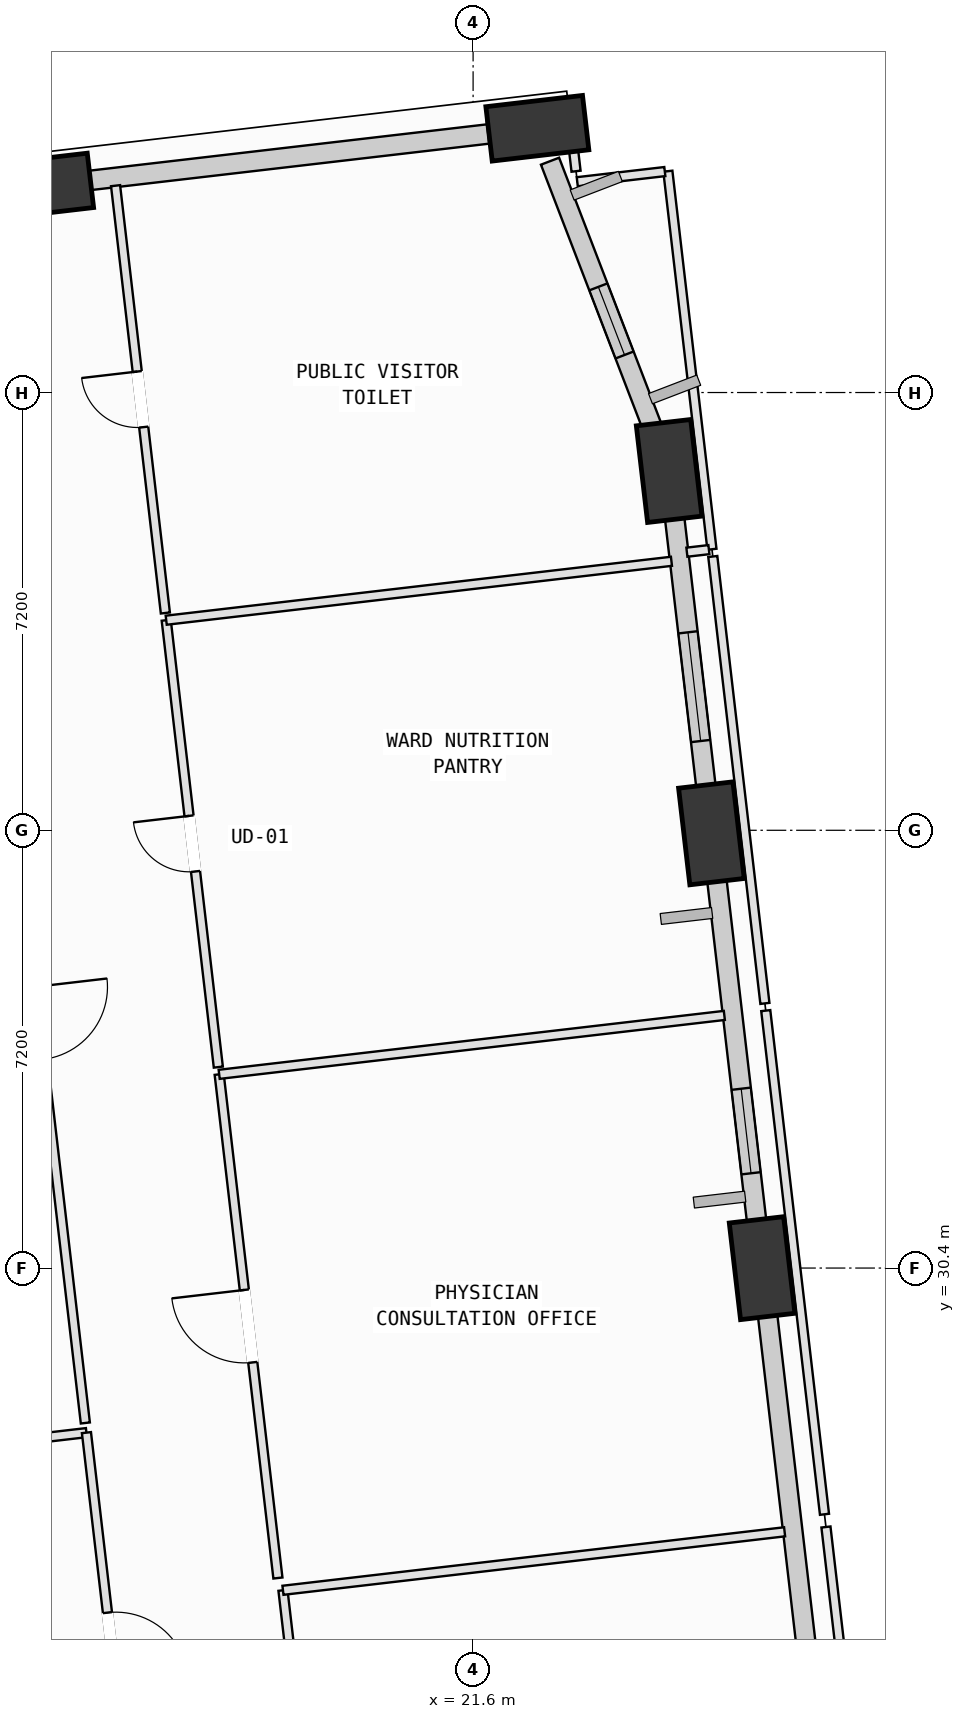
"""IFC4 building model, lengths in metres.
Left out: names, types, materials, properties, quantities, classifications, styles, units other than length and angle.
Written with IfcOpenShell. Run it as: python <this file> out.ifc"""

import sys

from ifc_helpers import new_model, si_unit, direction, frame, frame_2d, origin, origin_2d, place, context, subcontext, project, spatial, rectangle, extrude, element, fill, save


model = new_model("IFC4")
c1 = context("Model", 3, precision=1e-05, world=origin(), true_north=direction((0.0, 1.0)))
c2 = subcontext(c1, "Body", "Model", "MODEL_VIEW")
j1 = project(units=[si_unit("LENGTHUNIT", "METRE"), si_unit("PLANEANGLEUNIT", "RADIAN")], contexts=[c1])
p1 = place(None, origin())
s1 = spatial("IfcSite", under=j1, at=p1, CompositionType="ELEMENT")
p2 = place(p1, origin())
s2 = spatial("IfcBuilding", under=s1, at=p2, CompositionType="ELEMENT")
p3 = place(p2, frame((0.0, 0.0, 51.0)))
s3 = spatial("IfcBuildingStorey", under=s2, at=p3, CompositionType="ELEMENT", Elevation=51.0)
p4 = place(p3, frame((26.353, 30.398, 0.002), z_axis=(-0.022891292397, -0.030216505964, 0.999281217426), x_axis=(0.507057413613, 0.861089427661, 0.037653377935)))
e1 = element("IfcColumn", 1, at=p4, inside=s3, PredefinedType="COLUMN", context=c2, shape_type="SweptSolid", body=[
    extrude(rectangle(XDim=1.6, YDim=0.9, at=origin_2d()), origin(), (0.0, 0.0, 1.0), 4.0),
])
p5 = place(p3, frame((25.519, 37.55, 0.002), z_axis=(-0.052493535707, -0.033837296536, 0.998047827547), x_axis=(0.770485262961, 0.634432213866, 0.062034067813)))
e2 = element("IfcColumn", 2, at=p5, inside=s3, PredefinedType="COLUMN", context=c2, shape_type="SweptSolid", body=[
    extrude(rectangle(XDim=1.6, YDim=0.9, at=origin_2d()), origin(), (0.0, 0.0, 1.0), 4.004),
])
p6 = place(p3, frame((24.824, 43.51, 0.002), z_axis=(-0.076993381797, -0.036883786062, 0.996349138347), x_axis=(0.842487077733, 0.532000818436, 0.084797718345)))
e3 = element("IfcColumn", 3, at=p6, inside=s3, PredefinedType="COLUMN", context=c2, shape_type="SweptSolid", body=[
    extrude(rectangle(XDim=1.6, YDim=0.9, at=origin_2d()), origin(), (0.0, 0.0, 1.0), 4.011),
])
p7 = place(p3, frame((22.657, 49.146, 0.002), z_axis=(-0.099939863452, -0.045901905692, 0.993934121935), x_axis=(0.519165501749, -0.854578832845, 0.012735786087)))
e4 = element("IfcColumn", 4, at=p7, inside=s3, PredefinedType="COLUMN", context=c2, shape_type="SweptSolid", body=[
    extrude(rectangle(XDim=1.6, YDim=0.9, at=origin_2d()), origin(), (0.0, 0.0, 1.0), 4.021),
])
p8 = place(p3, frame((14.512, 48.197, 0.002), z_axis=(-0.095588978911, -0.079283693352, 0.992258455786), x_axis=(0.722555490387, -0.691163316507, 0.014381697639)))
e5 = element("IfcColumn", 5, at=p8, inside=s3, PredefinedType="COLUMN", context=c2, shape_type="SweptSolid", body=[
    extrude(rectangle(XDim=1.6, YDim=0.9, at=origin_2d()), origin(), (0.0, 0.0, 1.0), 4.028),
])
p9 = place(p3, frame((27.186, 23.25, 0.0), z_axis=(0.0, 0.0, 1.0), x_axis=(-0.115796553451, 0.993272952521, 0.0)))
e6 = element("IfcWall", 6, at=p9, inside=s3, PredefinedType="SOLIDWALL", context=c2, shape_type="SweptSolid", body=[
    extrude(rectangle(XDim=6.536, YDim=0.32, at=frame_2d((3.268, 0.0))), origin(), (0.0, 0.0, 1.0), 3.165),
])
p10 = place(p3, frame((26.289, 30.946, 0.0), z_axis=(0.0, 0.0, 1.0), x_axis=(-0.11579232978, 0.99327344491, 0.0)))
e7 = element("IfcWall", 7, at=p10, inside=s3, PredefinedType="SOLIDWALL", context=c2, shape_type="SweptSolid", body=[
    extrude(rectangle(XDim=5.996, YDim=0.32, at=frame_2d((2.998, 0.0))), origin(), (0.0, 0.0, 1.0), 3.165),
])
p11 = place(p10, frame((1.02, 0.0, 0.75)))
e8 = element("IfcOpeningElement", 8, at=p11, cuts=e7, PredefinedType="OPENING", context=c2, shape_type="SweptSolid", body=[
    extrude(rectangle(XDim=1.4, YDim=1.85, at=frame_2d((0.7, 0.925))), frame((0.0, 0.17, 0.0), z_axis=(0.0, -1.0, 0.0), x_axis=(1.0, 0.0, 0.0)), (0.0, 0.0, 1.0), 0.34),
])
p12 = place(p3, frame((25.456, 38.088, 0.0), z_axis=(0.0, 0.0, 1.0), x_axis=(-0.115776512347, 0.993275288723, 0.0)))
e9 = element("IfcWall", 9, at=p12, inside=s3, PredefinedType="SOLIDWALL", context=c2, shape_type="SweptSolid", body=[
    extrude(rectangle(XDim=4.816, YDim=0.32, at=frame_2d((2.408, 0.0))), origin(), (0.0, 0.0, 1.0), 3.165),
])
p13 = place(p12, frame((0.986, 0.0, 0.75)))
e10 = element("IfcOpeningElement", 10, at=p13, cuts=e9, PredefinedType="OPENING", context=c2, shape_type="SweptSolid", body=[
    extrude(rectangle(XDim=1.8, YDim=2.05, at=frame_2d((0.9, 1.025))), frame((0.0, 0.17, 0.0), z_axis=(0.0, -1.0, 0.0), x_axis=(1.0, 0.0, 0.0)), (0.0, 0.0, 1.0), 0.34),
])
p14 = place(p3, frame((22.865, 48.605, 0.0), z_axis=(0.0, 0.0, 1.0), x_axis=(0.358898766582, -0.933376491747, 0.0)))
e11 = element("IfcWall", 11, at=p14, inside=s3, PredefinedType="SOLIDWALL", context=c2, shape_type="SweptSolid", body=[
    extrude(rectangle(XDim=4.889, YDim=0.32, at=frame_2d((2.444, 0.0))), origin(), (0.0, 0.0, 1.0), 3.165),
])
p15 = place(p14, frame((2.215, 0.0, 0.75)))
e12 = element("IfcOpeningElement", 12, at=p15, cuts=e11, PredefinedType="OPENING", context=c2, shape_type="SweptSolid", body=[
    extrude(rectangle(XDim=1.2, YDim=1.75, at=frame_2d((0.6, 0.875))), frame((0.0, 0.17, 0.0), z_axis=(0.0, -1.0, 0.0), x_axis=(1.0, 0.0, 0.0)), (0.0, 0.0, 1.0), 0.34),
])
p16 = place(p3, frame((14.892, 48.241, 0.0), z_axis=(0.0, 0.0, 1.0), x_axis=(0.993270961566, 0.11581363007, 0.0)))
e13 = element("IfcWall", 13, at=p16, inside=s3, PredefinedType="SOLIDWALL", context=c2, shape_type="SweptSolid", body=[
    extrude(rectangle(XDim=7.003, YDim=0.32, at=frame_2d((3.501, 0.0))), origin(), (0.0, 0.0, 1.0), 3.165),
])
p17 = place(p3, frame((5.89, 26.603, 0.0), z_axis=(0.0, 0.0, 1.0), x_axis=(0.993273780871, 0.115789447851, 0.0)))
e14 = element("IfcWall", 14, at=p17, inside=s3, PredefinedType="PARTITIONING", context=c2, shape_type="SweptSolid", body=[
    extrude(rectangle(XDim=9.414, YDim=0.15, at=frame_2d((4.707, 0.0))), origin(), (0.0, 0.0, 1.0), 3.78),
])
p18 = place(p3, frame((15.241, 27.693, 0.0), z_axis=(0.0, 0.0, 1.0), x_axis=(0.115911530518, -0.993259541657, 0.0)))
e15 = element("IfcWall", 15, at=p18, inside=s3, PredefinedType="PARTITIONING", context=c2, shape_type="SweptSolid", body=[
    extrude(rectangle(XDim=7.161, YDim=0.15, at=frame_2d((3.581, 0.0))), origin(), (0.0, 0.0, 1.0), 3.78),
])
p19 = place(p18, frame((2.981, 0.0, 0.0)))
e16 = element("IfcOpeningElement", 16, at=p19, cuts=e15, PredefinedType="OPENING", context=c2, shape_type="SweptSolid", body=[
    extrude(rectangle(XDim=1.2, YDim=2.15, at=frame_2d((0.6, 1.075))), frame((0.0, 0.085, 0.0), z_axis=(0.0, -1.0, 0.0), x_axis=(1.0, 0.0, 0.0)), (0.0, 0.0, 1.0), 0.17),
])
p20 = place(p3, frame((13.69, 41.003, 0.0), z_axis=(0.0, 0.0, 1.0), x_axis=(0.11578306798, -0.993274524575, 0.0)))
e17 = element("IfcWall", 17, at=p20, inside=s3, PredefinedType="PARTITIONING", context=c2, shape_type="SweptSolid", body=[
    extrude(rectangle(XDim=13.24, YDim=0.15, at=frame_2d((6.62, 0.0))), origin(), (0.0, 0.0, 1.0), 2.865),
])
p21 = place(p20, frame((6.02, 0.0, 0.0)))
e18 = element("IfcOpeningElement", 18, at=p21, cuts=e17, PredefinedType="OPENING", context=c2, shape_type="SweptSolid", body=[
    extrude(rectangle(XDim=1.2, YDim=2.15, at=frame_2d((0.6, 1.075))), frame((0.0, 0.085, 0.0), z_axis=(0.0, -1.0, 0.0), x_axis=(1.0, 0.0, 0.0)), (0.0, 0.0, 1.0), 0.17),
])
p22 = place(p3, frame((19.0, 20.58, 0.0), z_axis=(0.0, 0.0, 1.0), x_axis=(-0.115829534516, 0.993269107007, 0.0)))
e19 = element("IfcWall", 19, at=p22, inside=s3, PredefinedType="PARTITIONING", context=c2, shape_type="SweptSolid", body=[
    extrude(rectangle(XDim=4.551, YDim=0.15, at=frame_2d((2.275, 0.0))), origin(), (0.0, 0.0, 1.0), 3.78),
])
p23 = place(p3, frame((18.473, 25.1, 0.0), z_axis=(0.0, 0.0, 1.0), x_axis=(0.993271256361, 0.115811101742, 0.0)))
e20 = element("IfcWall", 20, at=p23, inside=s3, PredefinedType="PARTITIONING", context=c2, shape_type="SweptSolid", body=[
    extrude(rectangle(XDim=8.306, YDim=0.15, at=frame_2d((4.153, 0.0))), origin(), (0.0, 0.0, 1.0), 3.78),
])
p24 = place(p3, frame((27.403, 26.141, 0.0), z_axis=(0.0, 0.0, 1.0), x_axis=(0.115762348631, -0.993276939549, 0.0)))
e21 = element("IfcWall", 21, at=p24, inside=s3, PredefinedType="PARTITIONING", context=c2, shape_type="SweptSolid", body=[
    extrude(rectangle(XDim=2.849, YDim=0.15, at=frame_2d((1.425, 0.0))), origin(), (0.0, 0.0, 1.0), 3.78),
])
p25 = place(p3, frame((27.733, 23.311, 0.0), z_axis=(0.0, 0.0, 1.0), x_axis=(0.993278060378, 0.115752731161, 0.0)))
e22 = element("IfcWall", 22, at=p25, inside=s3, PredefinedType="PARTITIONING", context=c2, shape_type="SweptSolid", body=[
    extrude(rectangle(XDim=14.368, YDim=0.15, at=frame_2d((7.184, 0.0))), origin(), (0.0, 0.0, 1.0), 3.165),
])
p26 = place(p3, frame((18.39, 25.302, 0.0), z_axis=(0.0, 0.0, 1.0), x_axis=(-0.115805129376, 0.993271952695, 0.0)))
e23 = element("IfcWall", 23, at=p26, inside=s3, PredefinedType="PARTITIONING", context=c2, shape_type="SweptSolid", body=[
    extrude(rectangle(XDim=8.34, YDim=0.15, at=frame_2d((4.17, 0.0))), origin(), (0.0, 0.0, 1.0), 3.78),
])
p27 = place(p26, frame((3.57, 0.0, 0.0)))
e24 = element("IfcOpeningElement", 24, at=p27, cuts=e23, PredefinedType="OPENING", context=c2, shape_type="SweptSolid", body=[
    extrude(rectangle(XDim=1.2, YDim=2.15, at=frame_2d((0.6, 1.075))), frame((0.0, 0.085, 0.0), z_axis=(0.0, -1.0, 0.0), x_axis=(1.0, 0.0, 0.0)), (0.0, 0.0, 1.0), 0.17),
])
p28 = place(p3, frame((17.424, 33.586, 0.0), z_axis=(0.0, 0.0, 1.0), x_axis=(0.993266666244, 0.115850462791, 0.0)))
e25 = element("IfcWall", 25, at=p28, inside=s3, PredefinedType="PARTITIONING", context=c2, shape_type="SweptSolid", body=[
    extrude(rectangle(XDim=8.364, YDim=0.15, at=frame_2d((4.182, 0.0))), origin(), (0.0, 0.0, 1.0), 3.78),
])
p29 = place(p3, frame((26.413, 34.634, 0.0), z_axis=(0.0, 0.0, 1.0), x_axis=(0.115805129376, -0.993271952695, 0.0)))
e26 = element("IfcWall", 26, at=p29, inside=s3, PredefinedType="PARTITIONING", context=c2, shape_type="SweptSolid", body=[
    extrude(rectangle(XDim=8.34, YDim=0.15, at=frame_2d((4.17, 0.0))), origin(), (0.0, 0.0, 1.0), 3.78),
])
p30 = place(p3, frame((17.41, 33.705, 0.0), z_axis=(0.0, 0.0, 1.0), x_axis=(-0.115807460553, 0.993271680901, 0.0)))
e27 = element("IfcWall", 27, at=p30, inside=s3, PredefinedType="PARTITIONING", context=c2, shape_type="SweptSolid", body=[
    extrude(rectangle(XDim=7.4, YDim=0.15, at=frame_2d((3.7, 0.0))), origin(), (0.0, 0.0, 1.0), 3.78),
])
p31 = place(p30, frame((3.24, 0.0, 0.0)))
e28 = element("IfcOpeningElement", 28, at=p31, cuts=e27, PredefinedType="OPENING", context=c2, shape_type="SweptSolid", body=[
    extrude(rectangle(XDim=0.92, YDim=2.1, at=frame_2d((0.46, 1.05))), frame((0.0, 0.085, 0.0), z_axis=(0.0, -1.0, 0.0), x_axis=(1.0, 0.0, 0.0)), (0.0, 0.0, 1.0), 0.17),
])
p32 = place(p3, frame((16.553, 41.055, 0.0), z_axis=(0.0, 0.0, 1.0), x_axis=(0.993268624582, 0.115833671357, 0.0)))
e29 = element("IfcWall", 29, at=p32, inside=s3, PredefinedType="PARTITIONING", context=c2, shape_type="SweptSolid", body=[
    extrude(rectangle(XDim=8.365, YDim=0.15, at=frame_2d((4.183, 0.0))), origin(), (0.0, 0.0, 1.0), 3.78),
])
p33 = place(p3, frame((25.542, 42.103, 0.0), z_axis=(0.0, 0.0, 1.0), x_axis=(0.115803665483, -0.993272123368, 0.0)))
e30 = element("IfcWall", 30, at=p33, inside=s3, PredefinedType="PARTITIONING", context=c2, shape_type="SweptSolid", body=[
    extrude(rectangle(XDim=7.4, YDim=0.15, at=frame_2d((3.7, 0.0))), origin(), (0.0, 0.0, 1.0), 3.78),
])
p34 = place(p3, frame((24.803, 48.44, 0.0), z_axis=(0.0, 0.0, 1.0), x_axis=(0.115827475013, -0.993269347172, 0.0)))
e31 = element("IfcWall", 31, at=p34, inside=s3, PredefinedType="PARTITIONING", context=c2, shape_type="SweptSolid", body=[
    extrude(rectangle(XDim=6.26, YDim=0.15, at=frame_2d((3.13, 0.0))), origin(), (0.0, 0.0, 1.0), 3.78),
])
p35 = place(p3, frame((25.478, 42.216, 0.0), z_axis=(0.0, 0.0, 1.0), x_axis=(-0.993341292973, -0.115208835058, 0.0)))
e32 = element("IfcWall", 32, at=p35, inside=s3, PredefinedType="PARTITIONING", context=c2, shape_type="SweptSolid", body=[
    extrude(rectangle(XDim=0.365, YDim=0.15, at=frame_2d((0.182, 0.0))), origin(), (0.0, 0.0, 1.0), 3.78),
])
p36 = place(p3, frame((16.539, 41.174, 0.0), z_axis=(0.0, 0.0, 1.0), x_axis=(-0.115766090086, 0.99327650349, 0.0)))
e33 = element("IfcWall", 33, at=p36, inside=s3, PredefinedType="PARTITIONING", context=c2, shape_type="SweptSolid", body=[
    extrude(rectangle(XDim=7.075, YDim=0.15, at=frame_2d((3.538, 0.0))), origin(), (0.0, 0.0, 1.0), 3.78),
])
p37 = place(p36, frame((3.078, 0.0, 0.0)))
e34 = element("IfcOpeningElement", 34, at=p37, cuts=e33, PredefinedType="OPENING", context=c2, shape_type="SweptSolid", body=[
    extrude(rectangle(XDim=0.92, YDim=2.1, at=frame_2d((0.46, 1.05))), frame((0.0, 0.085, 0.0), z_axis=(0.0, -1.0, 0.0), x_axis=(1.0, 0.0, 0.0)), (0.0, 0.0, 1.0), 0.17),
])
p38 = place(p3, frame((21.826, 49.241, 0.0), z_axis=(0.0, 0.0, 1.0), x_axis=(0.993273434785, 0.115792416632, 0.0)))
e35 = element("IfcWall", 35, at=p38, inside=s3, PredefinedType="PARTITIONING", context=c2, shape_type="SweptSolid", body=[
    extrude(rectangle(XDim=1.364, YDim=0.15, at=frame_2d((0.682, 0.0))), origin(), (0.0, 0.0, 1.0), 3.165),
])
p39 = place(p3, frame((23.187, 49.349, 0.0), z_axis=(0.0, 0.0, 1.0), x_axis=(0.115757899252, -0.993277458096, 0.0)))
e36 = element("IfcWall", 36, at=p39, inside=s3, PredefinedType="PARTITIONING", context=c2, shape_type="SweptSolid", body=[
    extrude(rectangle(XDim=0.915, YDim=0.15, at=frame_2d((0.458, 0.0))), origin(), (0.0, 0.0, 1.0), 3.78),
])
p40 = place(p3, frame((23.313, 48.267, 0.0), z_axis=(0.0, 0.0, 1.0), x_axis=(0.993342384661, 0.115199422026, 0.0)))
e37 = element("IfcWall", 37, at=p40, inside=s3, PredefinedType="PARTITIONING", context=c2, shape_type="SweptSolid", body=[
    extrude(rectangle(XDim=1.45, YDim=0.15, at=frame_2d((0.725, 0.0))), origin(), (0.0, 0.0, 1.0), 3.78),
])
p41 = place(p11, origin())
e38 = element("IfcWindow", 38, at=p41, inside=s3, PartitioningType="SINGLE_PANEL", PredefinedType="WINDOW", context=c2, shape_type="SweptSolid", body=[
    extrude(rectangle(XDim=1.4, YDim=1.85, at=frame_2d((0.7, 0.925))), frame((0.0, 0.03, 0.0), z_axis=(0.0, -1.0, 0.0), x_axis=(1.0, 0.0, 0.0)), (0.0, 0.0, 1.0), 0.06),
])
fill(e8, e38)
p42 = place(p13, origin())
e39 = element("IfcWindow", 39, at=p42, inside=s3, PartitioningType="SINGLE_PANEL", PredefinedType="WINDOW", context=c2, shape_type="SweptSolid", body=[
    extrude(rectangle(XDim=1.8, YDim=2.05, at=frame_2d((0.9, 1.025))), frame((0.0, 0.03, 0.0), z_axis=(0.0, -1.0, 0.0), x_axis=(1.0, 0.0, 0.0)), (0.0, 0.0, 1.0), 0.06),
])
fill(e10, e39)
p43 = place(p15, origin())
e40 = element("IfcWindow", 40, at=p43, inside=s3, PartitioningType="SINGLE_PANEL", PredefinedType="WINDOW", context=c2, shape_type="SweptSolid", body=[
    extrude(rectangle(XDim=1.2, YDim=1.75, at=frame_2d((0.6, 0.875))), frame((0.0, 0.03, 0.0), z_axis=(0.0, -1.0, 0.0), x_axis=(1.0, 0.0, 0.0)), (0.0, 0.0, 1.0), 0.06),
])
fill(e12, e40)
p44 = place(p19, origin())
e41 = element("IfcDoor", 41, at=p44, inside=s3, OperationType="SINGLE_SWING_RIGHT", PredefinedType="DOOR", context=c2, shape_type="SweptSolid", body=[
    extrude(rectangle(XDim=1.2, YDim=2.15, at=frame_2d((0.6, 1.075))), frame((0.0, 0.025, 0.0), z_axis=(0.0, -1.0, 0.0), x_axis=(1.0, 0.0, 0.0)), (0.0, 0.0, 1.0), 0.05),
])
fill(e16, e41)
p45 = place(p27, origin())
e42 = element("IfcDoor", 42, at=p45, inside=s3, OperationType="SINGLE_SWING_RIGHT", PredefinedType="DOOR", context=c2, shape_type="SweptSolid", body=[
    extrude(rectangle(XDim=1.2, YDim=2.15, at=frame_2d((0.6, 1.075))), frame((0.0, 0.025, 0.0), z_axis=(0.0, -1.0, 0.0), x_axis=(1.0, 0.0, 0.0)), (0.0, 0.0, 1.0), 0.05),
])
fill(e24, e42)
p46 = place(p31, origin())
e43 = element("IfcDoor", 43, at=p46, inside=s3, OperationType="SINGLE_SWING_RIGHT", PredefinedType="DOOR", context=c2, shape_type="SweptSolid", body=[
    extrude(rectangle(XDim=0.92, YDim=2.1, at=frame_2d((0.46, 1.05))), frame((0.0, 0.025, 0.0), z_axis=(0.0, -1.0, 0.0), x_axis=(1.0, 0.0, 0.0)), (0.0, 0.0, 1.0), 0.05),
])
fill(e28, e43)
p47 = place(p37, origin())
e44 = element("IfcDoor", 44, at=p47, inside=s3, OperationType="SINGLE_SWING_RIGHT", PredefinedType="DOOR", context=c2, shape_type="SweptSolid", body=[
    extrude(rectangle(XDim=0.92, YDim=2.1, at=frame_2d((0.46, 1.05))), frame((0.0, 0.025, 0.0), z_axis=(0.0, -1.0, 0.0), x_axis=(1.0, 0.0, 0.0)), (0.0, 0.0, 1.0), 0.05),
])
fill(e34, e44)
save(model, sys.argv[1])
